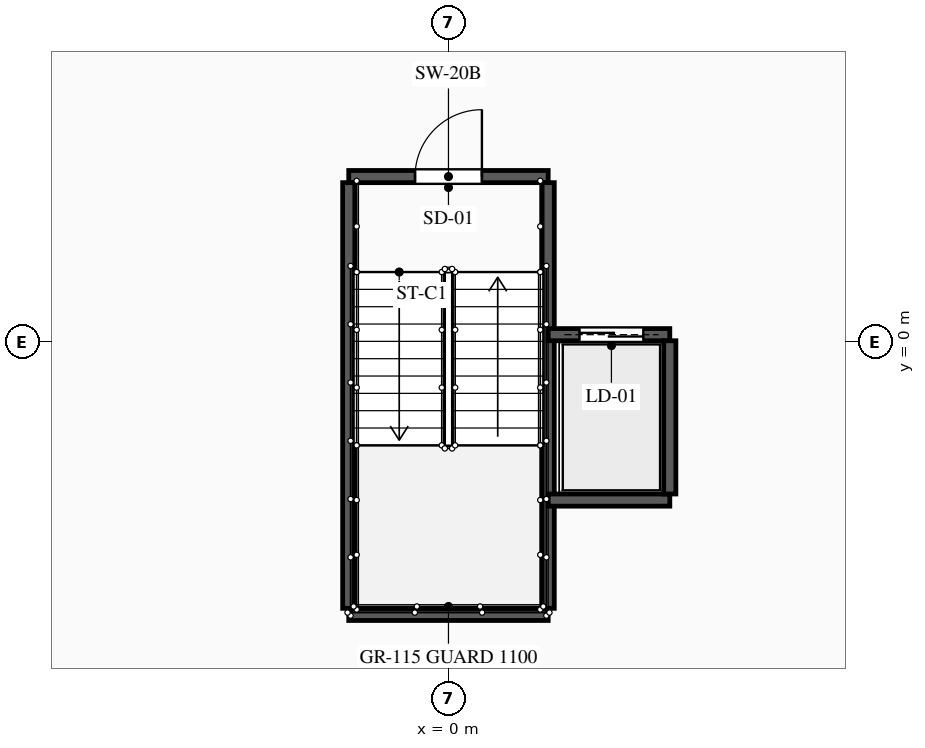
"""IFC4 building model, lengths in metres.
Left out: names, types, materials, properties, quantities, classifications, styles, units other than length and angle.
Written with IfcOpenShell. Run it as: python <this file> out.ifc"""

import sys

from ifc_helpers import new_model, si_unit, direction, frame, frame_2d, origin, place, context, subcontext, project, spatial, rectangle, extrude, element, fill, save


model = new_model("IFC4")
c1 = context("Model", 3, precision=1e-05, world=origin(), true_north=direction((0.0, 1.0)))
c2 = subcontext(c1, "Body", "Model", "MODEL_VIEW")
j1 = project(units=[si_unit("LENGTHUNIT", "METRE"), si_unit("PLANEANGLEUNIT", "RADIAN")], contexts=[c1])
p1 = place(None, origin())
s1 = spatial("IfcSite", under=j1, at=p1, CompositionType="ELEMENT")
p2 = place(p1, origin())
s2 = spatial("IfcBuilding", under=s1, at=p2, CompositionType="ELEMENT")
p3 = place(p2, frame((0.0, 0.0, 277.8)))
s3 = spatial("IfcBuildingStorey", under=s2, at=p3, CompositionType="ELEMENT", Elevation=277.8)
p4 = place(p3, frame((-1.64, 2.72, 0.0), z_axis=(0.0, 0.0, 1.0), x_axis=(1.0, 0.0, 0.0)))
e1 = element("IfcWall", 1, at=p4, inside=s3, PredefinedType="SHEAR", context=c2, shape_type="SweptSolid", body=[
    extrude(rectangle(XDim=3.28, YDim=0.2, at=frame_2d((1.64, 0.0))), origin(), (0.0, 0.0, 1.0), 3.4),
])
p5 = place(p4, frame((1.09, 0.0, 0.0)))
e2 = element("IfcOpeningElement", 2, at=p5, cuts=e1, PredefinedType="OPENING", context=c2, shape_type="SweptSolid", body=[
    extrude(rectangle(XDim=1.1, YDim=2.15, at=frame_2d((0.55, 1.075))), frame((0.0, 0.11, 0.0), z_axis=(0.0, -1.0, 0.0), x_axis=(1.0, 0.0, 0.0)), (0.0, 0.0, 1.0), 0.22),
])
p6 = place(p3, frame((-1.64, -4.48, 0.0), z_axis=(0.0, 0.0, 1.0), x_axis=(1.0, 0.0, 0.0)))
e3 = element("IfcWall", 3, at=p6, inside=s3, PredefinedType="SHEAR", context=c2, shape_type="SweptSolid", body=[
    extrude(rectangle(XDim=3.28, YDim=0.2, at=frame_2d((1.64, 0.0))), origin(), (0.0, 0.0, 1.0), 3.4),
])
for number, where, z_axis, x_axis in (
    (4, (-1.64, -4.38, 0.0), (0.0, 0.0, 1.0), (0.0, 1.0, 0.0)),
    (5, (1.64, -4.38, 0.0), (0.0, 0.0, 1.0), (0.0, 1.0, 0.0)),
):
    element("IfcWall", number, at=place(p3, frame(where, z_axis=z_axis, x_axis=x_axis)), inside=s3, PredefinedType="SHEAR", context=c2, shape_type="SweptSolid", body=[
        extrude(rectangle(XDim=7.0, YDim=0.2, at=frame_2d((3.5, 0.0))), origin(), (0.0, 0.0, 1.0), 3.4),
    ])
p7 = place(p3, frame((1.64, 0.12, 0.0), z_axis=(0.0, 0.0, 1.0), x_axis=(1.0, 0.0, 0.0)))
e6 = element("IfcWall", 6, at=p7, inside=s3, PredefinedType="SHEAR", context=c2, shape_type="SweptSolid", body=[
    extrude(rectangle(XDim=2.0, YDim=0.2, at=frame_2d((1.0, 0.0))), origin(), (0.0, 0.0, 1.0), 3.4),
])
p8 = place(p7, frame((0.515, 0.0, 0.0)))
e7 = element("IfcOpeningElement", 7, at=p8, cuts=e6, PredefinedType="OPENING", context=c2, shape_type="SweptSolid", body=[
    extrude(rectangle(XDim=1.05, YDim=2.1, at=frame_2d((0.525, 1.05))), frame((0.0, 0.11, 0.0), z_axis=(0.0, -1.0, 0.0), x_axis=(1.0, 0.0, 0.0)), (0.0, 0.0, 1.0), 0.22),
])
p9 = place(p3, frame((1.64, -2.6, 0.0), z_axis=(0.0, 0.0, 1.0), x_axis=(1.0, 0.0, 0.0)))
e8 = element("IfcWall", 8, at=p9, inside=s3, PredefinedType="SHEAR", context=c2, shape_type="SweptSolid", body=[
    extrude(rectangle(XDim=2.0, YDim=0.2, at=frame_2d((1.0, 0.0))), origin(), (0.0, 0.0, 1.0), 3.4),
])
p10 = place(p3, frame((3.64, -2.5, 0.0), z_axis=(0.0, 0.0, 1.0), x_axis=(0.0, 1.0, 0.0)))
e9 = element("IfcWall", 9, at=p10, inside=s3, PredefinedType="SHEAR", context=c2, shape_type="SweptSolid", body=[
    extrude(rectangle(XDim=2.52, YDim=0.2, at=frame_2d((1.26, 0.0))), origin(), (0.0, 0.0, 1.0), 3.4),
])
p11 = place(p5, origin())
e10 = element("IfcDoor", 10, at=p11, inside=s3, OperationType="SINGLE_SWING_RIGHT", PredefinedType="DOOR", context=c2, shape_type="SweptSolid", body=[
    extrude(rectangle(XDim=1.1, YDim=2.15, at=frame_2d((0.55, 1.075))), frame((0.0, 0.025, 0.0), z_axis=(0.0, -1.0, 0.0), x_axis=(1.0, 0.0, 0.0)), (0.0, 0.0, 1.0), 0.05),
])
fill(e2, e10)
p12 = place(p8, origin())
e11 = element("IfcDoor", 11, at=p12, inside=s3, OperationType="DOUBLE_DOOR_SLIDING", PredefinedType="DOOR", context=c2, shape_type="SweptSolid", body=[
    extrude(rectangle(XDim=1.05, YDim=2.1, at=frame_2d((0.525, 1.05))), frame((0.0, 0.025, 0.0), z_axis=(0.0, -1.0, 0.0), x_axis=(1.0, 0.0, 0.0)), (0.0, 0.0, 1.0), 0.05),
])
fill(e7, e11)
save(model, sys.argv[1])
